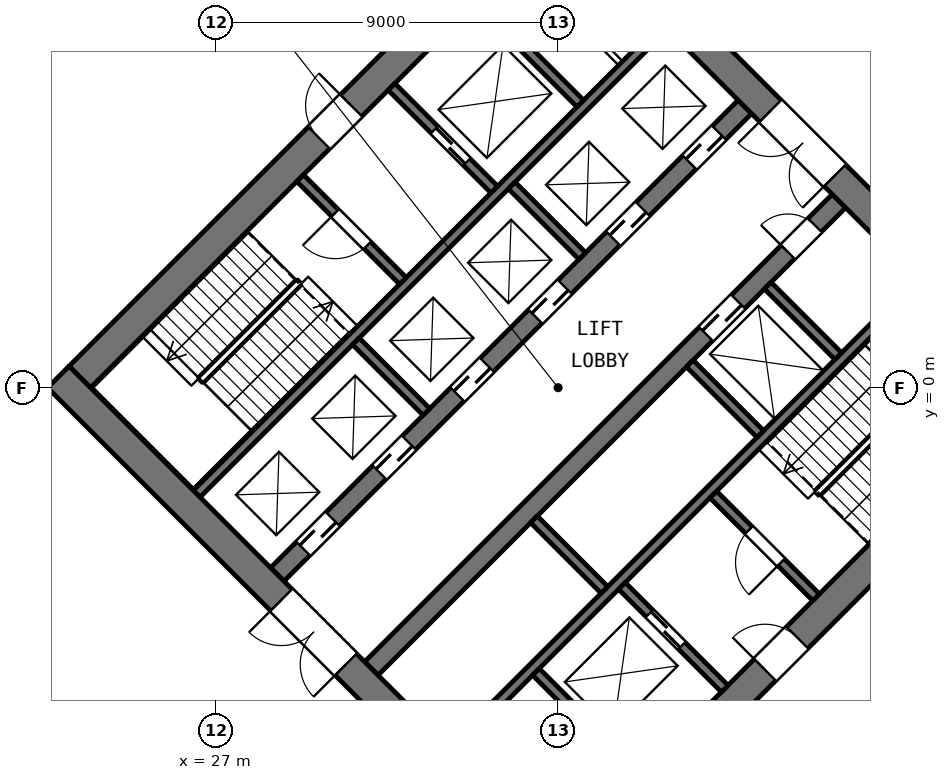
"""IFC4 building model, lengths in metres.
Left out: names, types, materials, properties, quantities, classifications, styles, units other than length and angle.
Written with IfcOpenShell. Run it as: python <this file> out.ifc"""

import sys

from ifc_helpers import new_model, si_unit, direction, frame, frame_2d, origin, place, context, subcontext, project, spatial, rectangle, extrude, element, fill, save


model = new_model("IFC4")
c1 = context("Model", 3, precision=1e-05, world=origin(), true_north=direction((0.0, 1.0)))
c2 = subcontext(c1, "Body", "Model", "MODEL_VIEW")
j1 = project(units=[si_unit("LENGTHUNIT", "METRE"), si_unit("PLANEANGLEUNIT", "RADIAN")], contexts=[c1])
p1 = place(None, origin())
s1 = spatial("IfcSite", under=j1, at=p1, CompositionType="ELEMENT")
p2 = place(p1, origin())
s2 = spatial("IfcBuilding", under=s1, at=p2, CompositionType="ELEMENT")
p3 = place(p2, frame((0.0, 0.0, 18.0)))
s3 = spatial("IfcBuildingStorey", under=s2, at=p3, CompositionType="ELEMENT", Elevation=18.0)
p4 = place(p3, frame((36.283, -12.586, 0.0), z_axis=(0.0, 0.0, 1.0), x_axis=(0.707106781187, 0.707106781187, 0.0)))
e1 = element("IfcWall", 1, at=p4, inside=s3, PredefinedType="SHEAR", context=c2, shape_type="SweptSolid", body=[
    extrude(rectangle(XDim=17.4, YDim=0.8, at=frame_2d((8.7, 0.0))), origin(), (0.0, 0.0, 1.0), 4.5),
])
p5 = place(p4, frame((7.3, 0.0, 0.0)))
e2 = element("IfcOpeningElement", 2, at=p5, cuts=e1, PredefinedType="OPENING", context=c2, shape_type="SweptSolid", body=[
    extrude(rectangle(XDim=1.2, YDim=2.1, at=frame_2d((0.6, 1.05))), frame((0.0, 0.41, 0.0), z_axis=(0.0, -1.0, 0.0), x_axis=(1.0, 0.0, 0.0)), (0.0, 0.0, 1.0), 0.82),
])
p6 = place(p4, frame((1.0, 0.0, 0.0)))
e3 = element("IfcOpeningElement", 3, at=p6, cuts=e1, PredefinedType="OPENING", context=c2, shape_type="SweptSolid", body=[
    extrude(rectangle(XDim=1.0, YDim=2.1, at=frame_2d((0.5, 1.05))), frame((0.0, 0.41, 0.0), z_axis=(0.0, -1.0, 0.0), x_axis=(1.0, 0.0, 0.0)), (0.0, 0.0, 1.0), 0.82),
])
p7 = place(p3, frame((33.207, -9.51, 0.0), z_axis=(0.0, 0.0, 1.0), x_axis=(0.707106781187, 0.707106781187, 0.0)))
e4 = element("IfcWall", 4, at=p7, inside=s3, PredefinedType="SHEAR", context=c2, shape_type="SweptSolid", body=[
    extrude(rectangle(XDim=17.4, YDim=0.25, at=frame_2d((8.7, 0.0))), origin(), (0.0, 0.0, 1.0), 4.5),
])
p8 = place(p3, frame((31.086, -7.389, 0.0), z_axis=(0.0, 0.0, 1.0), x_axis=(0.707106781187, 0.707106781187, 0.0)))
e5 = element("IfcWall", 5, at=p8, inside=s3, PredefinedType="SHEAR", context=c2, shape_type="SweptSolid", body=[
    extrude(rectangle(XDim=17.4, YDim=0.5, at=frame_2d((8.7, 0.0))), origin(), (0.0, 0.0, 1.0), 4.5),
])
p9 = place(p8, frame((12.45, 0.0, 0.0)))
e6 = element("IfcOpeningElement", 6, at=p9, cuts=e5, PredefinedType="OPENING", context=c2, shape_type="SweptSolid", body=[
    extrude(rectangle(XDim=1.2, YDim=2.1, at=frame_2d((0.6, 1.05))), frame((0.0, 0.26, 0.0), z_axis=(0.0, -1.0, 0.0), x_axis=(1.0, 0.0, 0.0)), (0.0, 0.0, 1.0), 0.52),
])
p10 = place(p8, frame((15.5, 0.0, 0.0)))
e7 = element("IfcOpeningElement", 7, at=p10, cuts=e5, PredefinedType="OPENING", context=c2, shape_type="SweptSolid", body=[
    extrude(rectangle(XDim=1.0, YDim=2.1, at=frame_2d((0.5, 1.05))), frame((0.0, 0.26, 0.0), z_axis=(0.0, -1.0, 0.0), x_axis=(1.0, 0.0, 0.0)), (0.0, 0.0, 1.0), 0.52),
])
p11 = place(p3, frame((28.611, -4.914, 0.0), z_axis=(0.0, 0.0, 1.0), x_axis=(0.707106781187, 0.707106781187, 0.0)))
e8 = element("IfcWall", 8, at=p11, inside=s3, PredefinedType="SHEAR", context=c2, shape_type="SweptSolid", body=[
    extrude(rectangle(XDim=17.4, YDim=0.5, at=frame_2d((8.7, 0.0))), origin(), (0.0, 0.0, 1.0), 4.5),
])
p12 = place(p11, frame((0.962, 0.0, 0.0)))
e9 = element("IfcOpeningElement", 9, at=p12, cuts=e8, PredefinedType="OPENING", context=c2, shape_type="SweptSolid", body=[
    extrude(rectangle(XDim=1.1, YDim=2.1, at=frame_2d((0.55, 1.05))), frame((0.0, 0.26, 0.0), z_axis=(0.0, -1.0, 0.0), x_axis=(1.0, 0.0, 0.0)), (0.0, 0.0, 1.0), 0.52),
])
p13 = place(p11, frame((3.8, 0.0, 0.0)))
e10 = element("IfcOpeningElement", 10, at=p13, cuts=e8, PredefinedType="OPENING", context=c2, shape_type="SweptSolid", body=[
    extrude(rectangle(XDim=1.1, YDim=2.1, at=frame_2d((0.55, 1.05))), frame((0.0, 0.26, 0.0), z_axis=(0.0, -1.0, 0.0), x_axis=(1.0, 0.0, 0.0)), (0.0, 0.0, 1.0), 0.52),
])
p14 = place(p11, frame((6.7, 0.0, 0.0)))
e11 = element("IfcOpeningElement", 11, at=p14, cuts=e8, PredefinedType="OPENING", context=c2, shape_type="SweptSolid", body=[
    extrude(rectangle(XDim=1.1, YDim=2.1, at=frame_2d((0.55, 1.05))), frame((0.0, 0.26, 0.0), z_axis=(0.0, -1.0, 0.0), x_axis=(1.0, 0.0, 0.0)), (0.0, 0.0, 1.0), 0.52),
])
p15 = place(p11, frame((9.6, 0.0, 0.0)))
e12 = element("IfcOpeningElement", 12, at=p15, cuts=e8, PredefinedType="OPENING", context=c2, shape_type="SweptSolid", body=[
    extrude(rectangle(XDim=1.1, YDim=2.1, at=frame_2d((0.55, 1.05))), frame((0.0, 0.26, 0.0), z_axis=(0.0, -1.0, 0.0), x_axis=(1.0, 0.0, 0.0)), (0.0, 0.0, 1.0), 0.52),
])
p16 = place(p11, frame((12.5, 0.0, 0.0)))
e13 = element("IfcOpeningElement", 13, at=p16, cuts=e8, PredefinedType="OPENING", context=c2, shape_type="SweptSolid", body=[
    extrude(rectangle(XDim=1.1, YDim=2.1, at=frame_2d((0.55, 1.05))), frame((0.0, 0.26, 0.0), z_axis=(0.0, -1.0, 0.0), x_axis=(1.0, 0.0, 0.0)), (0.0, 0.0, 1.0), 0.52),
])
p17 = place(p11, frame((15.337, 0.0, 0.0)))
e14 = element("IfcOpeningElement", 14, at=p17, cuts=e8, PredefinedType="OPENING", context=c2, shape_type="SweptSolid", body=[
    extrude(rectangle(XDim=1.1, YDim=2.1, at=frame_2d((0.55, 1.05))), frame((0.0, 0.26, 0.0), z_axis=(0.0, -1.0, 0.0), x_axis=(1.0, 0.0, 0.0)), (0.0, 0.0, 1.0), 0.52),
])
p18 = place(p3, frame((26.49, -2.793, 0.0), z_axis=(0.0, 0.0, 1.0), x_axis=(0.707106781187, 0.707106781187, 0.0)))
e15 = element("IfcWall", 15, at=p18, inside=s3, PredefinedType="SHEAR", context=c2, shape_type="SweptSolid", body=[
    extrude(rectangle(XDim=17.4, YDim=0.25, at=frame_2d((8.7, 0.0))), origin(), (0.0, 0.0, 1.0), 4.5),
])
p19 = place(p3, frame((23.414, 0.283, 0.0), z_axis=(0.0, 0.0, 1.0), x_axis=(0.707106781187, 0.707106781187, 0.0)))
e16 = element("IfcWall", 16, at=p19, inside=s3, PredefinedType="SHEAR", context=c2, shape_type="SweptSolid", body=[
    extrude(rectangle(XDim=17.4, YDim=0.8, at=frame_2d((8.7, 0.0))), origin(), (0.0, 0.0, 1.0), 4.5),
])
p20 = place(p19, frame((8.9, 0.0, 0.0)))
e17 = element("IfcOpeningElement", 17, at=p20, cuts=e16, PredefinedType="OPENING", context=c2, shape_type="SweptSolid", body=[
    extrude(rectangle(XDim=1.2, YDim=2.1, at=frame_2d((0.6, 1.05))), frame((0.0, 0.41, 0.0), z_axis=(0.0, -1.0, 0.0), x_axis=(1.0, 0.0, 0.0)), (0.0, 0.0, 1.0), 0.82),
])
p21 = place(p19, frame((14.7, 0.0, 0.0)))
e18 = element("IfcOpeningElement", 18, at=p21, cuts=e16, PredefinedType="OPENING", context=c2, shape_type="SweptSolid", body=[
    extrude(rectangle(XDim=0.9, YDim=2.1, at=frame_2d((0.45, 1.05))), frame((0.0, 0.41, 0.0), z_axis=(0.0, -1.0, 0.0), x_axis=(1.0, 0.0, 0.0)), (0.0, 0.0, 1.0), 0.82),
])
p22 = place(p19, frame((16.2, 0.0, 0.0)))
e19 = element("IfcOpeningElement", 19, at=p22, cuts=e16, PredefinedType="OPENING", context=c2, shape_type="SweptSolid", body=[
    extrude(rectangle(XDim=0.9, YDim=2.1, at=frame_2d((0.45, 1.05))), frame((0.0, 0.41, 0.0), z_axis=(0.0, -1.0, 0.0), x_axis=(1.0, 0.0, 0.0)), (0.0, 0.0, 1.0), 0.82),
])
p23 = place(p3, frame((36.283, -13.152, 0.0), z_axis=(0.0, 0.0, 1.0), x_axis=(-0.707106781187, 0.707106781187, 0.0)))
e20 = element("IfcWall", 20, at=p23, inside=s3, PredefinedType="SHEAR", context=c2, shape_type="SweptSolid", body=[
    extrude(rectangle(XDim=19.0, YDim=0.8, at=frame_2d((9.5, 0.0))), origin(), (0.0, 0.0, 1.0), 4.5),
])
p24 = place(p23, frame((8.3, 0.0, 0.0)))
e21 = element("IfcOpeningElement", 21, at=p24, cuts=e20, PredefinedType="OPENING", context=c2, shape_type="SweptSolid", body=[
    extrude(rectangle(XDim=2.4, YDim=2.1, at=frame_2d((1.2, 1.05))), frame((0.0, 0.41, 0.0), z_axis=(0.0, -1.0, 0.0), x_axis=(1.0, 0.0, 0.0)), (0.0, 0.0, 1.0), 0.82),
])
p25 = place(p3, frame((38.121, -10.182, 0.0), z_axis=(0.0, 0.0, 1.0), x_axis=(-0.707138693938, 0.707074866995, 0.0)))
e22 = element("IfcWall", 22, at=p25, inside=s3, PredefinedType="SHEAR", context=c2, shape_type="SweptSolid", body=[
    extrude(rectangle(XDim=3.825, YDim=0.25, at=frame_2d((1.913, 0.0))), origin(), (0.0, 0.0, 1.0), 4.5),
])
for number, where, z_axis, x_axis in (
    (23, (37.22, -5.321, 0.0), (0.0, 0.0, 1.0), (-0.707, 0.707, 0.0)),
    (24, (32.535, -0.636, 0.0), (0.0, 0.0, 1.0), (-0.707, 0.707, 0.0)),
):
    element("IfcWall", number, at=place(p3, frame(where, z_axis=z_axis, x_axis=x_axis)), inside=s3, PredefinedType="SHEAR", context=c2, shape_type="SweptSolid", body=[
        extrude(rectangle(XDim=2.625, YDim=0.25, at=frame_2d((1.312, 0.0))), origin(), (0.0, 0.0, 1.0), 4.5),
    ])
p26 = place(p3, frame((40.384, -7.92, 0.0), z_axis=(0.0, 0.0, 1.0), x_axis=(-0.707074866995, 0.707138693938, 0.0)))
e25 = element("IfcWall", 25, at=p26, inside=s3, PredefinedType="SHEAR", context=c2, shape_type="SweptSolid", body=[
    extrude(rectangle(XDim=3.825, YDim=0.25, at=frame_2d((1.913, 0.0))), origin(), (0.0, 0.0, 1.0), 4.5),
])
p27 = place(p26, frame((1.6, 0.0, 0.0)))
e26 = element("IfcOpeningElement", 26, at=p27, cuts=e25, PredefinedType="OPENING", context=c2, shape_type="SweptSolid", body=[
    extrude(rectangle(XDim=1.2, YDim=2.1, at=frame_2d((0.6, 1.05))), frame((0.0, 0.135, 0.0), z_axis=(0.0, -1.0, 0.0), x_axis=(1.0, 0.0, 0.0)), (0.0, 0.0, 1.0), 0.27),
])
p28 = place(p3, frame((31.917, 2.811, 0.0), z_axis=(0.0, 0.0, 1.0), x_axis=(-0.707106781187, 0.707106781187, 0.0)))
e27 = element("IfcWall", 27, at=p28, inside=s3, PredefinedType="SHEAR", context=c2, shape_type="SweptSolid", body=[
    extrude(rectangle(XDim=3.825, YDim=0.25, at=frame_2d((1.913, 0.0))), origin(), (0.0, 0.0, 1.0), 4.5),
])
p29 = place(p28, frame((1.325, 0.0, 0.0)))
e28 = element("IfcOpeningElement", 28, at=p29, cuts=e27, PredefinedType="OPENING", context=c2, shape_type="SweptSolid", body=[
    extrude(rectangle(XDim=1.2, YDim=2.1, at=frame_2d((0.6, 1.05))), frame((0.0, 0.135, 0.0), z_axis=(0.0, -1.0, 0.0), x_axis=(1.0, 0.0, 0.0)), (0.0, 0.0, 1.0), 0.27),
])
p30 = place(p3, frame((42.788, -5.515, 0.0), z_axis=(0.0, 0.0, 1.0), x_axis=(-0.707106781187, 0.707106781187, 0.0)))
e29 = element("IfcWall", 29, at=p30, inside=s3, PredefinedType="SHEAR", context=c2, shape_type="SweptSolid", body=[
    extrude(rectangle(XDim=3.825, YDim=0.25, at=frame_2d((1.913, 0.0))), origin(), (0.0, 0.0, 1.0), 4.5),
])
p31 = place(p30, frame((1.3, 0.0, 0.0)))
e30 = element("IfcOpeningElement", 30, at=p31, cuts=e29, PredefinedType="OPENING", context=c2, shape_type="SweptSolid", body=[
    extrude(rectangle(XDim=1.2, YDim=2.1, at=frame_2d((0.6, 1.05))), frame((0.0, 0.135, 0.0), z_axis=(0.0, -1.0, 0.0), x_axis=(1.0, 0.0, 0.0)), (0.0, 0.0, 1.0), 0.27),
])
p32 = place(p3, frame((34.321, 5.215, 0.0), z_axis=(0.0, 0.0, 1.0), x_axis=(-0.707074866995, 0.707138693938, 0.0)))
e31 = element("IfcWall", 31, at=p32, inside=s3, PredefinedType="SHEAR", context=c2, shape_type="SweptSolid", body=[
    extrude(rectangle(XDim=3.825, YDim=0.25, at=frame_2d((1.913, 0.0))), origin(), (0.0, 0.0, 1.0), 4.5),
])
p33 = place(p32, frame((1.025, 0.0, 0.0)))
e32 = element("IfcOpeningElement", 32, at=p33, cuts=e31, PredefinedType="OPENING", context=c2, shape_type="SweptSolid", body=[
    extrude(rectangle(XDim=1.2, YDim=2.1, at=frame_2d((0.6, 1.05))), frame((0.0, 0.135, 0.0), z_axis=(0.0, -1.0, 0.0), x_axis=(1.0, 0.0, 0.0)), (0.0, 0.0, 1.0), 0.27),
])
for number, where, z_axis, x_axis in (
    (33, (41.321, -1.22, 0.0), (0.0, 0.0, 1.0), (-0.707, 0.707, 0.0)),
    (34, (36.636, 3.465, 0.0), (0.0, 0.0, 1.0), (-0.707, 0.707, 0.0)),
):
    element("IfcWall", number, at=place(p3, frame(where, z_axis=z_axis, x_axis=x_axis)), inside=s3, PredefinedType="SHEAR", context=c2, shape_type="SweptSolid", body=[
        extrude(rectangle(XDim=2.625, YDim=0.25, at=frame_2d((1.312, 0.0))), origin(), (0.0, 0.0, 1.0), 4.5),
    ])
p34 = place(p3, frame((36.583, 7.478, 0.0), z_axis=(0.0, 0.0, 1.0), x_axis=(-0.707138693938, 0.707074866995, 0.0)))
e35 = element("IfcWall", 35, at=p34, inside=s3, PredefinedType="SHEAR", context=c2, shape_type="SweptSolid", body=[
    extrude(rectangle(XDim=3.825, YDim=0.25, at=frame_2d((1.913, 0.0))), origin(), (0.0, 0.0, 1.0), 4.5),
])
p35 = place(p3, frame((43.372, 0.831, 0.0), z_axis=(0.0, 0.0, 1.0), x_axis=(-0.707106781187, 0.707106781187, 0.0)))
e36 = element("IfcWall", 36, at=p35, inside=s3, PredefinedType="SHEAR", context=c2, shape_type="SweptSolid", body=[
    extrude(rectangle(XDim=2.625, YDim=0.25, at=frame_2d((1.312, 0.0))), origin(), (0.0, 0.0, 1.0), 4.5),
])
p36 = place(p3, frame((37.644, 8.538, 0.0), z_axis=(0.0, 0.0, 1.0), x_axis=(-0.707138693938, 0.707074866995, 0.0)))
e37 = element("IfcWall", 37, at=p36, inside=s3, PredefinedType="PARTITIONING", context=c2, shape_type="SweptSolid", body=[
    extrude(rectangle(XDim=3.825, YDim=0.15, at=frame_2d((1.913, 0.0))), origin(), (0.0, 0.0, 1.0), 4.5),
])
p37 = place(p3, frame((49.152, -0.283, 0.0), z_axis=(0.0, 0.0, 1.0), x_axis=(-0.707106781187, 0.707106781187, 0.0)))
e38 = element("IfcWall", 38, at=p37, inside=s3, PredefinedType="SHEAR", context=c2, shape_type="SweptSolid", body=[
    extrude(rectangle(XDim=19.0, YDim=0.8, at=frame_2d((9.5, 0.0))), origin(), (0.0, 0.0, 1.0), 4.5),
])
p38 = place(p37, frame((8.3, 0.0, 0.0)))
e39 = element("IfcOpeningElement", 39, at=p38, cuts=e38, PredefinedType="OPENING", context=c2, shape_type="SweptSolid", body=[
    extrude(rectangle(XDim=2.4, YDim=2.1, at=frame_2d((1.2, 1.05))), frame((0.0, 0.41, 0.0), z_axis=(0.0, -1.0, 0.0), x_axis=(1.0, 0.0, 0.0)), (0.0, 0.0, 1.0), 0.82),
])
p39 = place(p24, origin())
e40 = element("IfcDoor", 40, at=p39, inside=s3, OperationType="DOUBLE_DOOR_SINGLE_SWING", PredefinedType="DOOR", context=c2, shape_type="SweptSolid", body=[
    extrude(rectangle(XDim=2.4, YDim=2.1, at=frame_2d((1.2, 1.05))), frame((0.0, -0.225, 0.0), z_axis=(0.0, -1.0, 0.0), x_axis=(1.0, 0.0, 0.0)), (0.0, 0.0, 1.0), 0.05),
])
fill(e21, e40)
p40 = place(p38, origin())
e41 = element("IfcDoor", 41, at=p40, inside=s3, OperationType="DOUBLE_DOOR_SINGLE_SWING", PredefinedType="DOOR", context=c2, shape_type="SweptSolid", body=[
    extrude(rectangle(XDim=2.4, YDim=2.1, at=frame_2d((1.2, 1.05))), frame((0.0, 0.275, 0.0), z_axis=(0.0, -1.0, 0.0), x_axis=(1.0, 0.0, 0.0)), (0.0, 0.0, 1.0), 0.05),
])
fill(e39, e41)
p41 = place(p12, origin())
e42 = element("IfcDoor", 42, at=p41, inside=s3, OperationType="SLIDING_TO_LEFT", PredefinedType="DOOR", context=c2, shape_type="SweptSolid", body=[
    extrude(rectangle(XDim=1.1, YDim=2.1, at=frame_2d((0.55, 1.05))), frame((0.0, 0.025, 0.0), z_axis=(0.0, -1.0, 0.0), x_axis=(1.0, 0.0, 0.0)), (0.0, 0.0, 1.0), 0.05),
])
fill(e9, e42)
p42 = place(p13, origin())
e43 = element("IfcDoor", 43, at=p42, inside=s3, OperationType="SLIDING_TO_LEFT", PredefinedType="DOOR", context=c2, shape_type="SweptSolid", body=[
    extrude(rectangle(XDim=1.1, YDim=2.1, at=frame_2d((0.55, 1.05))), frame((0.0, 0.025, 0.0), z_axis=(0.0, -1.0, 0.0), x_axis=(1.0, 0.0, 0.0)), (0.0, 0.0, 1.0), 0.05),
])
fill(e10, e43)
p43 = place(p14, origin())
e44 = element("IfcDoor", 44, at=p43, inside=s3, OperationType="SLIDING_TO_LEFT", PredefinedType="DOOR", context=c2, shape_type="SweptSolid", body=[
    extrude(rectangle(XDim=1.1, YDim=2.1, at=frame_2d((0.55, 1.05))), frame((0.0, 0.025, 0.0), z_axis=(0.0, -1.0, 0.0), x_axis=(1.0, 0.0, 0.0)), (0.0, 0.0, 1.0), 0.05),
])
fill(e11, e44)
p44 = place(p15, origin())
e45 = element("IfcDoor", 45, at=p44, inside=s3, OperationType="SLIDING_TO_LEFT", PredefinedType="DOOR", context=c2, shape_type="SweptSolid", body=[
    extrude(rectangle(XDim=1.1, YDim=2.1, at=frame_2d((0.55, 1.05))), frame((0.0, 0.025, 0.0), z_axis=(0.0, -1.0, 0.0), x_axis=(1.0, 0.0, 0.0)), (0.0, 0.0, 1.0), 0.05),
])
fill(e12, e45)
p45 = place(p16, origin())
e46 = element("IfcDoor", 46, at=p45, inside=s3, OperationType="SLIDING_TO_LEFT", PredefinedType="DOOR", context=c2, shape_type="SweptSolid", body=[
    extrude(rectangle(XDim=1.1, YDim=2.1, at=frame_2d((0.55, 1.05))), frame((0.0, 0.025, 0.0), z_axis=(0.0, -1.0, 0.0), x_axis=(1.0, 0.0, 0.0)), (0.0, 0.0, 1.0), 0.05),
])
fill(e13, e46)
p46 = place(p17, origin())
e47 = element("IfcDoor", 47, at=p46, inside=s3, OperationType="SLIDING_TO_LEFT", PredefinedType="DOOR", context=c2, shape_type="SweptSolid", body=[
    extrude(rectangle(XDim=1.1, YDim=2.1, at=frame_2d((0.55, 1.05))), frame((0.0, 0.025, 0.0), z_axis=(0.0, -1.0, 0.0), x_axis=(1.0, 0.0, 0.0)), (0.0, 0.0, 1.0), 0.05),
])
fill(e14, e47)
p47 = place(p9, origin())
e48 = element("IfcDoor", 48, at=p47, inside=s3, OperationType="SLIDING_TO_LEFT", PredefinedType="DOOR", context=c2, shape_type="SweptSolid", body=[
    extrude(rectangle(XDim=1.2, YDim=2.1, at=frame_2d((0.6, 1.05))), frame((0.0, 0.025, 0.0), z_axis=(0.0, -1.0, 0.0), x_axis=(1.0, 0.0, 0.0)), (0.0, 0.0, 1.0), 0.05),
])
fill(e6, e48)
p48 = place(p33, origin())
e49 = element("IfcDoor", 49, at=p48, inside=s3, OperationType="SLIDING_TO_LEFT", PredefinedType="DOOR", context=c2, shape_type="SweptSolid", body=[
    extrude(rectangle(XDim=1.2, YDim=2.1, at=frame_2d((0.6, 1.05))), frame((0.0, 0.025, 0.0), z_axis=(0.0, -1.0, 0.0), x_axis=(1.0, 0.0, 0.0)), (0.0, 0.0, 1.0), 0.05),
])
fill(e32, e49)
p49 = place(p27, origin())
e50 = element("IfcDoor", 50, at=p49, inside=s3, OperationType="SLIDING_TO_LEFT", PredefinedType="DOOR", context=c2, shape_type="SweptSolid", body=[
    extrude(rectangle(XDim=1.2, YDim=2.1, at=frame_2d((0.6, 1.05))), frame((0.0, 0.025, 0.0), z_axis=(0.0, -1.0, 0.0), x_axis=(1.0, 0.0, 0.0)), (0.0, 0.0, 1.0), 0.05),
])
fill(e26, e50)
p50 = place(p10, origin())
e51 = element("IfcDoor", 51, at=p50, inside=s3, OperationType="SINGLE_SWING_LEFT", PredefinedType="DOOR", context=c2, shape_type="SweptSolid", body=[
    extrude(rectangle(XDim=1.0, YDim=2.1, at=frame_2d((0.5, 1.05))), frame((0.0, 0.025, 0.0), z_axis=(0.0, -1.0, 0.0), x_axis=(1.0, 0.0, 0.0)), (0.0, 0.0, 1.0), 0.05),
])
fill(e7, e51)
p51 = place(p29, origin())
e52 = element("IfcDoor", 52, at=p51, inside=s3, OperationType="SINGLE_SWING_RIGHT", PredefinedType="DOOR", context=c2, shape_type="SweptSolid", body=[
    extrude(rectangle(XDim=1.2, YDim=2.1, at=frame_2d((0.6, 1.05))), frame((0.0, 0.025, 0.0), z_axis=(0.0, -1.0, 0.0), x_axis=(1.0, 0.0, 0.0)), (0.0, 0.0, 1.0), 0.05),
])
fill(e28, e52)
p52 = place(p31, origin())
e53 = element("IfcDoor", 53, at=p52, inside=s3, OperationType="SINGLE_SWING_LEFT", PredefinedType="DOOR", context=c2, shape_type="SweptSolid", body=[
    extrude(rectangle(XDim=1.2, YDim=2.1, at=frame_2d((0.6, 1.05))), frame((0.0, 0.025, 0.0), z_axis=(0.0, -1.0, 0.0), x_axis=(1.0, 0.0, 0.0)), (0.0, 0.0, 1.0), 0.05),
])
fill(e30, e53)
p53 = place(p20, origin())
e54 = element("IfcDoor", 54, at=p53, inside=s3, OperationType="SINGLE_SWING_RIGHT", PredefinedType="DOOR", context=c2, shape_type="SweptSolid", body=[
    extrude(rectangle(XDim=1.2, YDim=2.1, at=frame_2d((0.6, 1.05))), frame((0.0, -0.225, 0.0), z_axis=(0.0, -1.0, 0.0), x_axis=(1.0, 0.0, 0.0)), (0.0, 0.0, 1.0), 0.05),
])
fill(e17, e54)
p54 = place(p5, origin())
e55 = element("IfcDoor", 55, at=p54, inside=s3, OperationType="SINGLE_SWING_LEFT", PredefinedType="DOOR", context=c2, shape_type="SweptSolid", body=[
    extrude(rectangle(XDim=1.2, YDim=2.1, at=frame_2d((0.6, 1.05))), frame((0.0, 0.275, 0.0), z_axis=(0.0, -1.0, 0.0), x_axis=(1.0, 0.0, 0.0)), (0.0, 0.0, 1.0), 0.05),
])
fill(e2, e55)
save(model, sys.argv[1])
